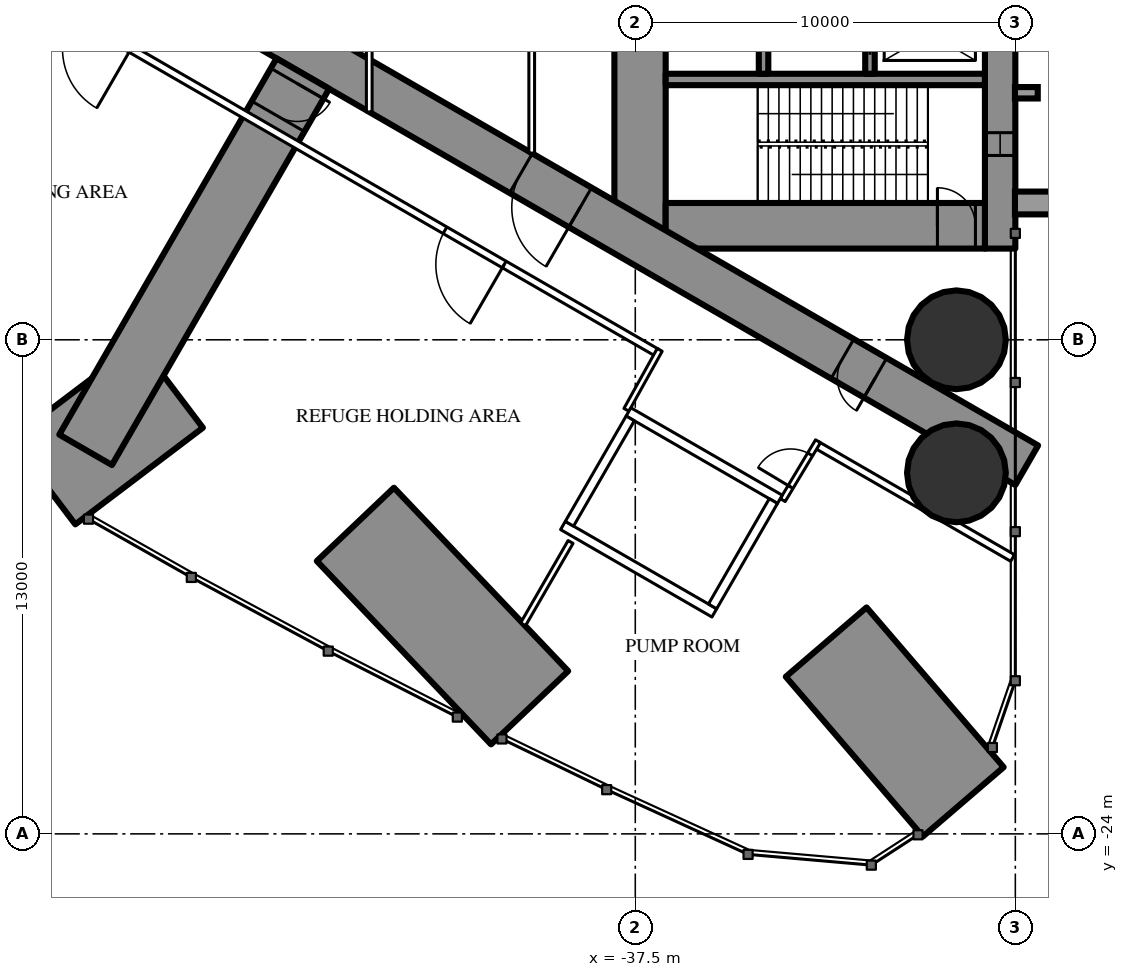
"""IFC4 building model, lengths in metres.
Left out: names, types, materials, properties, quantities, classifications, styles, units other than length and angle.
Written with IfcOpenShell. Run it as: python <this file> out.ifc"""

import sys

from ifc_helpers import new_model, si_unit, direction, frame, frame_2d, origin, origin_2d, place, context, subcontext, project, spatial, rectangle, hollow_circle, extrude, element, fill, save


model = new_model("IFC4")
c1 = context("Model", 3, precision=1e-05, world=origin(), true_north=direction((0.0, 1.0)))
c2 = subcontext(c1, "Body", "Model", "MODEL_VIEW")
j1 = project(units=[si_unit("LENGTHUNIT", "METRE"), si_unit("PLANEANGLEUNIT", "RADIAN")], contexts=[c1])
p1 = place(None, origin())
s1 = spatial("IfcSite", under=j1, at=p1, CompositionType="ELEMENT")
p2 = place(p1, origin())
s2 = spatial("IfcBuilding", under=s1, at=p2, CompositionType="ELEMENT")
p3 = place(p2, frame((0.0, 0.0, 146.7)))
s3 = spatial("IfcBuildingStorey", under=s2, at=p3, CompositionType="ELEMENT", Elevation=146.7)
p4 = place(p3, frame((-28.869, -23.157, 0.0), z_axis=(0.0, 0.0, 1.0), x_axis=(-0.651270313566, 0.75884582009, 0.0)))
e1 = element("IfcWall", 1, at=p4, inside=s3, PredefinedType="SHEAR", context=c2, shape_type="SweptSolid", body=[
    extrude(rectangle(XDim=5.54, YDim=2.8, at=frame_2d((2.77, 0.0))), origin(), (0.0, 0.0, 1.0), 6.0),
])
for number, where, z_axis, x_axis in (
    (2, (-29.05, -11.0, 0.0), (0.0, 0.0, 1.0), (1.0, 0.0, 0.0)),
    (3, (-29.05, -14.5, 0.0), (0.0, 0.0, 1.0), (1.0, 0.0, 0.0)),
):
    element("IfcColumn", number, at=place(p3, frame(where, z_axis=z_axis, x_axis=x_axis)), inside=s3, PredefinedType="COLUMN", context=c2, shape_type="SweptSolid", body=[
        extrude(hollow_circle(Radius=1.3, WallThickness=0.1, at=origin_2d()), origin(), (0.0, 0.0, 1.0), 6.0),
    ])
p5 = place(p3, frame((-53.079, -14.74, 0.0), z_axis=(0.0, 0.0, 1.0), x_axis=(0.797075233676, 0.603880014457, 0.0)))
e4 = element("IfcWall", 4, at=p5, inside=s3, PredefinedType="SHEAR", context=c2, shape_type="SweptSolid", body=[
    extrude(rectangle(XDim=4.211, YDim=2.8, at=frame_2d((2.105, 0.0))), origin(), (0.0, 0.0, 1.0), 6.0),
])
p6 = place(p3, frame((-40.281, -20.681, 0.0), z_axis=(0.0, 0.0, 1.0), x_axis=(-0.688883466121, 0.724872106033, 0.0)))
e5 = element("IfcWall", 5, at=p6, inside=s3, PredefinedType="SHEAR", context=c2, shape_type="SweptSolid", body=[
    extrude(rectangle(XDim=6.655, YDim=2.8, at=frame_2d((3.328, 0.0))), origin(), (0.0, 0.0, 1.0), 6.0),
])
p7 = place(p3, frame((-27.9, 8.6, 0.0), z_axis=(0.0, 0.0, 1.0), x_axis=(0.0, -1.0, 0.0)))
e6 = element("IfcWall", 6, at=p7, inside=s3, PredefinedType="SHEAR", context=c2, shape_type="SweptSolid", body=[
    extrude(rectangle(XDim=17.2, YDim=0.8, at=frame_2d((8.6, 0.0))), origin(), (0.0, 0.0, 1.0), 6.0),
])
p8 = place(p7, frame((2.45, 0.0, 0.6)))
e7 = element("IfcOpeningElement", 7, at=p8, cuts=e6, PredefinedType="OPENING", context=c2, shape_type="SweptSolid", body=[
    extrude(rectangle(XDim=0.6, YDim=4.5, at=frame_2d((0.3, 2.25))), frame((0.0, 0.41, 0.0), z_axis=(0.0, -1.0, 0.0), x_axis=(1.0, 0.0, 0.0)), (0.0, 0.0, 1.0), 0.82),
])
p9 = place(p7, frame((14.15, 0.0, 0.6)))
e8 = element("IfcOpeningElement", 8, at=p9, cuts=e6, PredefinedType="OPENING", context=c2, shape_type="SweptSolid", body=[
    extrude(rectangle(XDim=0.6, YDim=4.5, at=frame_2d((0.3, 2.25))), frame((0.0, 0.41, 0.0), z_axis=(0.0, -1.0, 0.0), x_axis=(1.0, 0.0, 0.0)), (0.0, 0.0, 1.0), 0.82),
])
p10 = place(p3, frame((-37.375, 8.6, 0.0), z_axis=(0.0, 0.0, 1.0), x_axis=(0.0, -1.0, 0.0)))
e9 = element("IfcWall", 9, at=p10, inside=s3, PredefinedType="SHEAR", context=c2, shape_type="SweptSolid", body=[
    extrude(rectangle(XDim=17.2, YDim=1.35, at=frame_2d((8.6, 0.0))), origin(), (0.0, 0.0, 1.0), 6.0),
])
p11 = place(p10, frame((7.7, 0.0, 0.0)))
e10 = element("IfcOpeningElement", 10, at=p11, cuts=e9, PredefinedType="OPENING", context=c2, shape_type="SweptSolid", body=[
    extrude(rectangle(XDim=1.8, YDim=2.2, at=frame_2d((0.9, 1.1))), frame((0.0, 0.685, 0.0), z_axis=(0.0, -1.0, 0.0), x_axis=(1.0, 0.0, 0.0)), (0.0, 0.0, 1.0), 1.37),
])
p12 = place(p3, frame((-28.3, -8.0, 0.0), z_axis=(0.0, 0.0, 1.0), x_axis=(-1.0, 0.0, 0.0)))
e11 = element("IfcWall", 11, at=p12, inside=s3, PredefinedType="SHEAR", context=c2, shape_type="SweptSolid", body=[
    extrude(rectangle(XDim=8.4, YDim=1.2, at=frame_2d((4.2, 0.0))), origin(), (0.0, 0.0, 1.0), 6.0),
])
p13 = place(p12, frame((0.25, 0.0, 0.0)))
e12 = element("IfcOpeningElement", 12, at=p13, cuts=e11, PredefinedType="OPENING", context=c2, shape_type="SweptSolid", body=[
    extrude(rectangle(XDim=1.0, YDim=2.2, at=frame_2d((0.5, 1.1))), frame((0.0, 0.61, 0.0), z_axis=(0.0, -1.0, 0.0), x_axis=(1.0, 0.0, 0.0)), (0.0, 0.0, 1.0), 1.22),
])
p14 = place(p3, frame((-28.3, -4.15, 0.0), z_axis=(0.0, 0.0, 1.0), x_axis=(-1.0, 0.0, 0.0)))
e13 = element("IfcWall", 13, at=p14, inside=s3, PredefinedType="SHEAR", context=c2, shape_type="SweptSolid", body=[
    extrude(rectangle(XDim=8.4, YDim=0.3, at=frame_2d((4.2, 0.0))), origin(), (0.0, 0.0, 1.0), 6.0),
])
p15 = place(p3, frame((-31.325, -1.9, 0.0), z_axis=(0.0, 0.0, 1.0), x_axis=(0.0, -1.0, 0.0)))
e14 = element("IfcWall", 14, at=p15, inside=s3, PredefinedType="SHEAR", context=c2, shape_type="SweptSolid", body=[
    extrude(rectangle(XDim=2.1, YDim=0.25, at=frame_2d((1.05, 0.0))), origin(), (0.0, 0.0, 1.0), 6.0),
])
p16 = place(p15, frame((0.5, 0.0, 0.0)))
e15 = element("IfcOpeningElement", 15, at=p16, cuts=e14, PredefinedType="OPENING", context=c2, shape_type="SweptSolid", body=[
    extrude(rectangle(XDim=1.1, YDim=2.2, at=frame_2d((0.55, 1.1))), frame((0.0, 0.135, 0.0), z_axis=(0.0, -1.0, 0.0), x_axis=(1.0, 0.0, 0.0)), (0.0, 0.0, 1.0), 0.27),
])
p17 = place(p3, frame((-34.125, -1.65, 0.0), z_axis=(0.0, 0.0, 1.0), x_axis=(0.0, -1.0, 0.0)))
e16 = element("IfcWall", 16, at=p17, inside=s3, PredefinedType="SHEAR", context=c2, shape_type="SweptSolid", body=[
    extrude(rectangle(XDim=2.35, YDim=0.25, at=frame_2d((1.175, 0.0))), origin(), (0.0, 0.0, 1.0), 6.0),
])
p18 = place(p3, frame((-27.2, -14.3, 0.0), z_axis=(0.0, 0.0, 1.0), x_axis=(-0.866024021859, 0.500002393557, 0.0)))
e17 = element("IfcWall", 17, at=p18, inside=s3, PredefinedType="SHEAR", context=c2, shape_type="SweptSolid", body=[
    extrude(rectangle(XDim=27.907, YDim=1.2, at=frame_2d((13.954, 0.0))), origin(), (0.0, 0.0, 1.0), 6.0),
])
p19 = place(p18, frame((4.6, 0.0, 0.0)))
e18 = element("IfcOpeningElement", 18, at=p19, cuts=e17, PredefinedType="OPENING", context=c2, shape_type="SweptSolid", body=[
    extrude(rectangle(XDim=1.0, YDim=2.2, at=frame_2d((0.5, 1.1))), frame((0.0, 0.61, 0.0), z_axis=(0.0, -1.0, 0.0), x_axis=(1.0, 0.0, 0.0)), (0.0, 0.0, 1.0), 1.22),
])
p20 = place(p18, frame((13.568, 0.0, 0.0)))
e19 = element("IfcOpeningElement", 19, at=p20, cuts=e17, PredefinedType="OPENING", context=c2, shape_type="SweptSolid", body=[
    extrude(rectangle(XDim=1.8, YDim=2.2, at=frame_2d((0.9, 1.1))), frame((0.0, 0.61, 0.0), z_axis=(0.0, -1.0, 0.0), x_axis=(1.0, 0.0, 0.0)), (0.0, 0.0, 1.0), 1.22),
])
p21 = place(p3, frame((-46.248, -3.996, 0.0), z_axis=(0.0, 0.0, 1.0), x_axis=(-0.499993613132, -0.866029091213, 0.0)))
e20 = element("IfcWall", 20, at=p21, inside=s3, PredefinedType="SHEAR", context=c2, shape_type="SweptSolid", body=[
    extrude(rectangle(XDim=11.431, YDim=1.6, at=frame_2d((5.715, 0.0))), origin(), (0.0, 0.0, 1.0), 6.0),
])
p22 = place(p21, frame((0.3, 0.0, 0.0)))
e21 = element("IfcOpeningElement", 21, at=p22, cuts=e20, PredefinedType="OPENING", context=c2, shape_type="SweptSolid", body=[
    extrude(rectangle(XDim=1.0, YDim=2.2, at=frame_2d((0.5, 1.1))), frame((0.0, 0.81, 0.0), z_axis=(0.0, -1.0, 0.0), x_axis=(1.0, 0.0, 0.0)), (0.0, 0.0, 1.0), 1.62),
])
p23 = place(p3, frame((-39.202, -16.32, 0.0), z_axis=(0.0, 0.0, 1.0), x_axis=(-0.500046524342, -0.865998541277, 0.0)))
e22 = element("IfcWall", 22, at=p23, inside=s3, PredefinedType="PARTITIONING", context=c2, shape_type="SweptSolid", body=[
    extrude(rectangle(XDim=2.5, YDim=0.15, at=frame_2d((1.25, 0.0))), origin(), (0.0, 0.0, 1.0), 5.75),
])
p24 = place(p3, frame((-27.572, -16.741, 0.0), z_axis=(0.0, 0.0, 1.0), x_axis=(-0.866024464444, 0.500001626982, 0.0)))
e23 = element("IfcWall", 23, at=p24, inside=s3, PredefinedType="PARTITIONING", context=c2, shape_type="SweptSolid", body=[
    extrude(rectangle(XDim=5.955, YDim=0.2, at=frame_2d((2.978, 0.0))), origin(), (0.0, 0.0, 1.0), 5.75),
])
p25 = place(p3, frame((-36.92, -11.344, 0.0), z_axis=(0.0, 0.0, 1.0), x_axis=(-0.866028313256, 0.499994960614, 0.0)))
e24 = element("IfcWall", 24, at=p25, inside=s3, PredefinedType="PARTITIONING", context=c2, shape_type="SweptSolid", body=[
    extrude(rectangle(XDim=22.568, YDim=0.2, at=frame_2d((11.284, 0.0))), origin(), (0.0, 0.0, 1.0), 5.75),
])
p26 = place(p25, frame((15.994, 0.0, 0.0)))
e25 = element("IfcOpeningElement", 25, at=p26, cuts=e24, PredefinedType="OPENING", context=c2, shape_type="SweptSolid", body=[
    extrude(rectangle(XDim=1.8, YDim=2.2, at=frame_2d((0.9, 1.1))), frame((0.0, 0.11, 0.0), z_axis=(0.0, -1.0, 0.0), x_axis=(1.0, 0.0, 0.0)), (0.0, 0.0, 1.0), 0.22),
])
p27 = place(p25, frame((4.651, 0.0, 0.0)))
e26 = element("IfcOpeningElement", 26, at=p27, cuts=e24, PredefinedType="OPENING", context=c2, shape_type="SweptSolid", body=[
    extrude(rectangle(XDim=1.8, YDim=2.2, at=frame_2d((0.9, 1.1))), frame((0.0, 0.11, 0.0), z_axis=(0.0, -1.0, 0.0), x_axis=(1.0, 0.0, 0.0)), (0.0, 0.0, 1.0), 0.22),
])
p28 = place(p3, frame((-36.857, -11.265, 0.0), z_axis=(0.0, 0.0, 1.0), x_axis=(-0.485482130951, -0.874246590229, 0.0)))
e27 = element("IfcWall", 27, at=p28, inside=s3, PredefinedType="PARTITIONING", context=c2, shape_type="SweptSolid", body=[
    extrude(rectangle(XDim=1.805, YDim=0.15, at=frame_2d((0.902, 0.0))), origin(), (0.0, 0.0, 1.0), 5.75),
])
p29 = place(p3, frame((-33.621, -15.218, 0.0), z_axis=(0.0, 0.0, 1.0), x_axis=(0.514336634837, 0.857588377991, 0.0)))
e28 = element("IfcWall", 28, at=p29, inside=s3, PredefinedType="PARTITIONING", context=c2, shape_type="SweptSolid", body=[
    extrude(rectangle(XDim=1.805, YDim=0.15, at=frame_2d((0.903, 0.0))), origin(), (0.0, 0.0, 1.0), 5.75),
])
p30 = place(p29, frame((0.403, 0.0, 0.0)))
e29 = element("IfcOpeningElement", 29, at=p30, cuts=e28, PredefinedType="OPENING", context=c2, shape_type="SweptSolid", body=[
    extrude(rectangle(XDim=1.0, YDim=2.2, at=frame_2d((0.5, 1.1))), frame((0.0, 0.085, 0.0), z_axis=(0.0, -1.0, 0.0), x_axis=(1.0, 0.0, 0.0)), (0.0, 0.0, 1.0), 0.17),
])
p31 = place(p3, frame((-40.225, 6.087, 0.0), z_axis=(0.0, 0.0, 1.0), x_axis=(0.0, -1.0, 0.0)))
e30 = element("IfcWall", 30, at=p31, inside=s3, PredefinedType="PARTITIONING", context=c2, shape_type="SweptSolid", body=[
    extrude(rectangle(XDim=12.174, YDim=0.15, at=frame_2d((6.087, 0.0))), origin(), (0.0, 0.0, 1.0), 5.75),
])
p32 = place(p31, frame((5.187, 0.0, 0.0)))
e31 = element("IfcOpeningElement", 31, at=p32, cuts=e30, PredefinedType="OPENING", context=c2, shape_type="SweptSolid", body=[
    extrude(rectangle(XDim=1.8, YDim=2.2, at=frame_2d((0.9, 1.1))), frame((0.0, 0.085, 0.0), z_axis=(0.0, -1.0, 0.0), x_axis=(1.0, 0.0, 0.0)), (0.0, 0.0, 1.0), 0.17),
])
p33 = place(p3, frame((-44.5, 5.005, 0.0), z_axis=(0.0, 0.0, 1.0), x_axis=(0.0, -1.0, 0.0)))
e32 = element("IfcWall", 32, at=p33, inside=s3, PredefinedType="PARTITIONING", context=c2, shape_type="SweptSolid", body=[
    extrude(rectangle(XDim=10.009, YDim=0.15, at=frame_2d((5.005, 0.0))), origin(), (0.0, 0.0, 1.0), 5.75),
])
p34 = place(p33, frame((4.505, 0.0, 0.0)))
e33 = element("IfcOpeningElement", 33, at=p34, cuts=e32, PredefinedType="OPENING", context=c2, shape_type="SweptSolid", body=[
    extrude(rectangle(XDim=1.0, YDim=2.2, at=frame_2d((0.5, 1.1))), frame((0.0, 0.085, 0.0), z_axis=(0.0, -1.0, 0.0), x_axis=(1.0, 0.0, 0.0)), (0.0, 0.0, 1.0), 0.17),
])
p35 = place(p3, frame((-33.696, -15.197, 0.0), z_axis=(0.0, 0.0, 1.0), x_axis=(-0.865976953817, 0.500083908417, 0.0)))
e34 = element("IfcWall", 34, at=p35, inside=s3, PredefinedType="PARTITIONING", context=c2, shape_type="SweptSolid", body=[
    extrude(rectangle(XDim=4.599, YDim=0.25, at=frame_2d((2.3, 0.0))), origin(), (0.0, 0.0, 1.0), 5.75),
])
p36 = place(p3, frame((-35.42, -18.186, 0.0), z_axis=(0.0, 0.0, 1.0), x_axis=(-0.865990227814, 0.50006092162, 0.0)))
e35 = element("IfcWall", 35, at=p36, inside=s3, PredefinedType="PARTITIONING", context=c2, shape_type="SweptSolid", body=[
    extrude(rectangle(XDim=4.6, YDim=0.25, at=frame_2d((2.3, 0.0))), origin(), (0.0, 0.0, 1.0), 5.75),
])
p37 = place(p3, frame((-33.866, -15.243, 0.0), z_axis=(0.0, 0.0, 1.0), x_axis=(-0.499929347863, -0.866066190972, 0.0)))
e36 = element("IfcWall", 36, at=p37, inside=s3, PredefinedType="PARTITIONING", context=c2, shape_type="SweptSolid", body=[
    extrude(rectangle(XDim=3.201, YDim=0.25, at=frame_2d((1.6, 0.0))), origin(), (0.0, 0.0, 1.0), 5.75),
])
p38 = place(p3, frame((-37.633, -13.068, 0.0), z_axis=(0.0, 0.0, 1.0), x_axis=(-0.499872130319, -0.866099216793, 0.0)))
e37 = element("IfcWall", 37, at=p38, inside=s3, PredefinedType="PARTITIONING", context=c2, shape_type="SweptSolid", body=[
    extrude(rectangle(XDim=3.2, YDim=0.25, at=frame_2d((1.6, 0.0))), origin(), (0.0, 0.0, 1.0), 5.75),
])
p39 = place(p22, origin())
e38 = element("IfcDoor", 38, at=p39, inside=s3, OperationType="SINGLE_SWING_LEFT", PredefinedType="DOOR", context=c2, shape_type="SweptSolid", body=[
    extrude(rectangle(XDim=1.0, YDim=2.2, at=frame_2d((0.5, 1.1))), frame((0.0, 0.025, 0.0), z_axis=(0.0, -1.0, 0.0), x_axis=(1.0, 0.0, 0.0)), (0.0, 0.0, 1.0), 0.05),
])
fill(e21, e38)
p40 = place(p27, origin())
e39 = element("IfcDoor", 39, at=p40, inside=s3, OperationType="DOUBLE_DOOR_SINGLE_SWING", PredefinedType="DOOR", context=c2, shape_type="SweptSolid", body=[
    extrude(rectangle(XDim=1.8, YDim=2.2, at=frame_2d((0.9, 1.1))), frame((0.0, 0.025, 0.0), z_axis=(0.0, -1.0, 0.0), x_axis=(1.0, 0.0, 0.0)), (0.0, 0.0, 1.0), 0.05),
])
fill(e26, e39)
p41 = place(p30, origin())
e40 = element("IfcDoor", 40, at=p41, inside=s3, OperationType="SINGLE_SWING_LEFT", PredefinedType="DOOR", context=c2, shape_type="SweptSolid", body=[
    extrude(rectangle(XDim=1.0, YDim=2.2, at=frame_2d((0.5, 1.1))), frame((0.0, 0.025, 0.0), z_axis=(0.0, -1.0, 0.0), x_axis=(1.0, 0.0, 0.0)), (0.0, 0.0, 1.0), 0.05),
])
fill(e29, e40)
p42 = place(p19, origin())
e41 = element("IfcDoor", 41, at=p42, inside=s3, OperationType="SINGLE_SWING_LEFT", PredefinedType="DOOR", context=c2, shape_type="SweptSolid", body=[
    extrude(rectangle(XDim=1.0, YDim=2.2, at=frame_2d((0.5, 1.1))), frame((0.0, 0.025, 0.0), z_axis=(0.0, -1.0, 0.0), x_axis=(1.0, 0.0, 0.0)), (0.0, 0.0, 1.0), 0.05),
])
fill(e18, e41)
p43 = place(p20, origin())
e42 = element("IfcDoor", 42, at=p43, inside=s3, OperationType="DOUBLE_DOOR_SINGLE_SWING", PredefinedType="DOOR", context=c2, shape_type="SweptSolid", body=[
    extrude(rectangle(XDim=1.8, YDim=2.2, at=frame_2d((0.9, 1.1))), frame((0.0, 0.025, 0.0), z_axis=(0.0, -1.0, 0.0), x_axis=(1.0, 0.0, 0.0)), (0.0, 0.0, 1.0), 0.05),
])
fill(e19, e42)
p44 = place(p13, origin())
e43 = element("IfcDoor", 43, at=p44, inside=s3, OperationType="SINGLE_SWING_RIGHT", PredefinedType="DOOR", context=c2, shape_type="SweptSolid", body=[
    extrude(rectangle(XDim=1.0, YDim=2.2, at=frame_2d((0.5, 1.1))), frame((0.0, 0.025, 0.0), z_axis=(0.0, -1.0, 0.0), x_axis=(1.0, 0.0, 0.0)), (0.0, 0.0, 1.0), 0.05),
])
fill(e12, e43)
p45 = place(p16, origin())
e44 = element("IfcDoor", 44, at=p45, inside=s3, OperationType="SLIDING_TO_LEFT", PredefinedType="USERDEFINED", context=c2, shape_type="SweptSolid", body=[
    extrude(rectangle(XDim=1.1, YDim=2.2, at=frame_2d((0.55, 1.1))), frame((0.0, 0.025, 0.0), z_axis=(0.0, -1.0, 0.0), x_axis=(1.0, 0.0, 0.0)), (0.0, 0.0, 1.0), 0.05),
])
fill(e15, e44)
p46 = place(p9, origin())
e45 = element("IfcWindow", 45, at=p46, inside=s3, PartitioningType="SINGLE_PANEL", PredefinedType="WINDOW", context=c2, shape_type="SweptSolid", body=[
    extrude(rectangle(XDim=0.6, YDim=4.5, at=frame_2d((0.3, 2.25))), frame((0.0, 0.03, 0.0), z_axis=(0.0, -1.0, 0.0), x_axis=(1.0, 0.0, 0.0)), (0.0, 0.0, 1.0), 0.06),
])
fill(e8, e45)
save(model, sys.argv[1])
